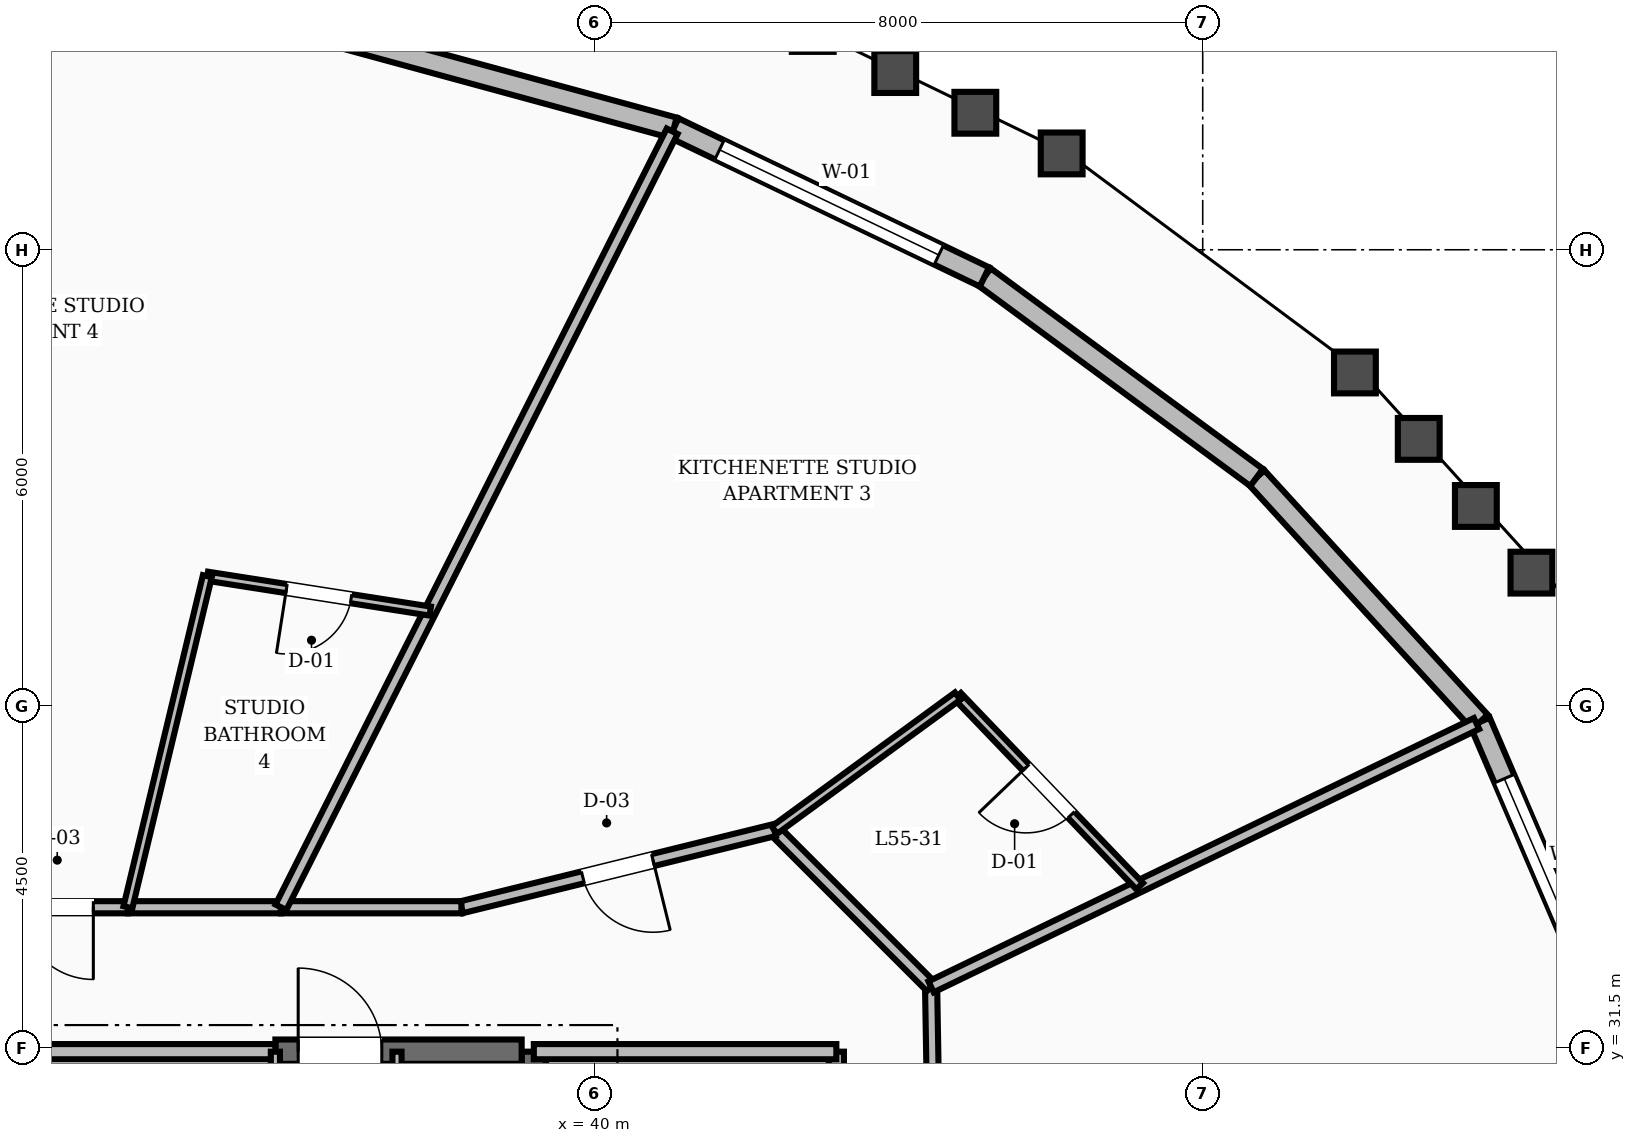
"""IFC4 building model, lengths in metres.
Left out: names, types, materials, properties, quantities, classifications, styles, units other than length and angle.
Written with IfcOpenShell. Run it as: python <this file> out.ifc"""

import sys

from ifc_helpers import new_model, si_unit, direction, frame, frame_2d, origin, place, context, subcontext, project, spatial, rectangle, extrude, element, fill, save


model = new_model("IFC4")
c1 = context("Model", 3, precision=1e-05, world=origin(), true_north=direction((0.0, 1.0)))
c2 = subcontext(c1, "Body", "Model", "MODEL_VIEW")
j1 = project(units=[si_unit("LENGTHUNIT", "METRE"), si_unit("PLANEANGLEUNIT", "RADIAN")], contexts=[c1])
p1 = place(None, origin())
s1 = spatial("IfcSite", under=j1, at=p1, CompositionType="ELEMENT")
p2 = place(p1, origin())
s2 = spatial("IfcBuilding", under=s1, at=p2, CompositionType="ELEMENT")
p3 = place(p2, frame((0.0, 0.0, 214.8)))
s3 = spatial("IfcBuildingStorey", under=s2, at=p3, CompositionType="ELEMENT", Elevation=214.8)
p4 = place(p3, frame((39.2, 25.15, 0.0), z_axis=(0.0, 0.0, 1.0), x_axis=(0.0, 1.0, 0.0)))
e1 = element("IfcWall", 1, at=p4, inside=s3, PredefinedType="SHEAR", context=c2, shape_type="SweptSolid", body=[
    extrude(rectangle(XDim=6.3, YDim=0.32, at=frame_2d((3.15, 0.0))), origin(), (0.0, 0.0, 1.0), 3.6),
])
p5 = place(p3, frame((35.8, 31.45, 0.0), z_axis=(0.0, 0.0, 1.0), x_axis=(1.0, 0.0, 0.0)))
e2 = element("IfcWall", 2, at=p5, inside=s3, PredefinedType="SHEAR", context=c2, shape_type="SweptSolid", body=[
    extrude(rectangle(XDim=3.24, YDim=0.32, at=frame_2d((1.62, 0.0))), origin(), (0.0, 0.0, 1.0), 3.6),
])
p6 = place(p5, frame((0.3, 0.0, 0.0)))
e3 = element("IfcOpeningElement", 3, at=p6, cuts=e2, PredefinedType="OPENING", context=c2, shape_type="SweptSolid", body=[
    extrude(rectangle(XDim=1.1, YDim=2.1, at=frame_2d((0.55, 1.05))), frame((0.0, 0.17, 0.0), z_axis=(0.0, -1.0, 0.0), x_axis=(1.0, 0.0, 0.0)), (0.0, 0.0, 1.0), 0.34),
])
p7 = place(p3, frame((53.35, 31.821, 0.0), z_axis=(0.0, 0.0, 1.0), x_axis=(-0.394335596309, 0.918966505094, 0.0)))
e4 = element("IfcWall", 4, at=p7, inside=s3, PredefinedType="STANDARD", context=c2, shape_type="SweptSolid", body=[
    extrude(rectangle(XDim=4.317, YDim=0.28, at=frame_2d((2.159, 0.0))), origin(), (0.0, 0.0, 1.0), 2.88),
])
p8 = place(p7, frame((0.905, 0.0, 0.8)))
e5 = element("IfcOpeningElement", 5, at=p8, cuts=e4, PredefinedType="OPENING", context=c2, shape_type="SweptSolid", body=[
    extrude(rectangle(XDim=2.6, YDim=1.65, at=frame_2d((1.3, 0.825))), frame((0.0, 0.15, 0.0), z_axis=(0.0, -1.0, 0.0), x_axis=(1.0, 0.0, 0.0)), (0.0, 0.0, 1.0), 0.3),
])
p9 = place(p3, frame((51.648, 35.789, 0.0), z_axis=(0.0, 0.0, 1.0), x_axis=(-0.674642715371, 0.73814443478, 0.0)))
e6 = element("IfcWall", 6, at=p9, inside=s3, PredefinedType="STANDARD", context=c2, shape_type="SweptSolid", body=[
    extrude(rectangle(XDim=4.356, YDim=0.28, at=frame_2d((2.178, 0.0))), origin(), (0.0, 0.0, 1.0), 2.88),
])
p10 = place(p3, frame((48.709, 39.004, 0.0), z_axis=(0.0, 0.0, 1.0), x_axis=(-0.8050103103, 0.593260819801, 0.0)))
e7 = element("IfcWall", 7, at=p10, inside=s3, PredefinedType="STANDARD", context=c2, shape_type="SweptSolid", body=[
    extrude(rectangle(XDim=4.448, YDim=0.28, at=frame_2d((2.224, 0.0))), origin(), (0.0, 0.0, 1.0), 2.88),
])
p11 = place(p3, frame((45.128, 41.643, 0.0), z_axis=(0.0, 0.0, 1.0), x_axis=(-0.90155079899, 0.432673267999, 0.0)))
e8 = element("IfcWall", 8, at=p11, inside=s3, PredefinedType="STANDARD", context=c2, shape_type="SweptSolid", body=[
    extrude(rectangle(XDim=4.531, YDim=0.28, at=frame_2d((2.266, 0.0))), origin(), (0.0, 0.0, 1.0), 2.88),
])
p12 = place(p11, frame((0.666, 0.0, 0.8)))
e9 = element("IfcOpeningElement", 9, at=p12, cuts=e8, PredefinedType="OPENING", context=c2, shape_type="SweptSolid", body=[
    extrude(rectangle(XDim=3.2, YDim=1.65, at=frame_2d((1.6, 0.825))), frame((0.0, 0.15, 0.0), z_axis=(0.0, -1.0, 0.0), x_axis=(1.0, 0.0, 0.0)), (0.0, 0.0, 1.0), 0.3),
])
p13 = place(p3, frame((41.043, 43.604, 0.0), z_axis=(0.0, 0.0, 1.0), x_axis=(-0.964839814396, 0.26283860553, 0.0)))
e10 = element("IfcWall", 10, at=p13, inside=s3, PredefinedType="STANDARD", context=c2, shape_type="SweptSolid", body=[
    extrude(rectangle(XDim=4.594, YDim=0.28, at=frame_2d((2.297, 0.0))), origin(), (0.0, 0.0, 1.0), 2.88),
])
p14 = place(p3, frame((43.18, 28.32, 0.0), z_axis=(0.0, 0.0, 1.0), x_axis=(0.0, 1.0, 0.0)))
e11 = element("IfcWall", 11, at=p14, inside=s3, PredefinedType="SOLIDWALL", context=c2, shape_type="SweptSolid", body=[
    extrude(rectangle(XDim=3.13, YDim=0.2, at=frame_2d((1.565, 0.0))), origin(), (0.0, 0.0, 1.0), 2.87),
])
p15 = place(p14, frame((1.015, 0.0, 0.0)))
e12 = element("IfcOpeningElement", 12, at=p15, cuts=e11, PredefinedType="OPENING", context=c2, shape_type="SweptSolid", body=[
    extrude(rectangle(XDim=1.1, YDim=2.1, at=frame_2d((0.55, 1.05))), frame((0.0, 0.11, 0.0), z_axis=(0.0, -1.0, 0.0), x_axis=(1.0, 0.0, 0.0)), (0.0, 0.0, 1.0), 0.22),
])
p16 = place(p3, frame((39.2, 31.45, 0.0), z_axis=(0.0, 0.0, 1.0), x_axis=(1.0, 0.0, 0.0)))
e13 = element("IfcWall", 13, at=p16, inside=s3, PredefinedType="SOLIDWALL", context=c2, shape_type="SweptSolid", body=[
    extrude(rectangle(XDim=3.98, YDim=0.2, at=frame_2d((1.99, 0.0))), origin(), (0.0, 0.0, 1.0), 2.87),
])
p17 = place(p3, frame((28.2, 31.45, 0.0), z_axis=(0.0, 0.0, 1.0), x_axis=(1.0, 0.0, 0.0)))
e14 = element("IfcWall", 14, at=p17, inside=s3, PredefinedType="SOLIDWALL", context=c2, shape_type="SweptSolid", body=[
    extrude(rectangle(XDim=7.6, YDim=0.2, at=frame_2d((3.8, 0.0))), origin(), (0.0, 0.0, 1.0), 2.87),
])
p18 = place(p3, frame((35.8, 27.95, 0.0), z_axis=(0.0, 0.0, 1.0), x_axis=(0.0, 1.0, 0.0)))
e15 = element("IfcWall", 15, at=p18, inside=s3, PredefinedType="PARTITIONING", context=c2, shape_type="SweptSolid", body=[
    extrude(rectangle(XDim=3.5, YDim=0.12, at=frame_2d((1.75, 0.0))), origin(), (0.0, 0.0, 1.0), 2.87),
])
p19 = place(p18, frame((1.275, 0.0, 0.0)))
e16 = element("IfcOpeningElement", 16, at=p19, cuts=e15, PredefinedType="OPENING", context=c2, shape_type="SweptSolid", body=[
    extrude(rectangle(XDim=0.95, YDim=2.1, at=frame_2d((0.475, 1.05))), frame((0.0, 0.07, 0.0), z_axis=(0.0, -1.0, 0.0), x_axis=(1.0, 0.0, 0.0)), (0.0, 0.0, 1.0), 0.14),
])
p20 = place(p3, frame((37.4, 25.25, 0.0), z_axis=(0.0, 0.0, 1.0), x_axis=(0.0, 1.0, 0.0)))
e17 = element("IfcWall", 17, at=p20, inside=s3, PredefinedType="PARTITIONING", context=c2, shape_type="SweptSolid", body=[
    extrude(rectangle(XDim=6.2, YDim=0.12, at=frame_2d((3.1, 0.0))), origin(), (0.0, 0.0, 1.0), 2.87),
])
p21 = place(p20, frame((0.8, 0.0, 0.0)))
e18 = element("IfcOpeningElement", 18, at=p21, cuts=e17, PredefinedType="OPENING", context=c2, shape_type="SweptSolid", body=[
    extrude(rectangle(XDim=0.86, YDim=2.1, at=frame_2d((0.43, 1.05))), frame((0.0, 0.07, 0.0), z_axis=(0.0, -1.0, 0.0), x_axis=(1.0, 0.0, 0.0)), (0.0, 0.0, 1.0), 0.14),
])
p22 = place(p20, frame((3.8, 0.0, 0.0)))
e19 = element("IfcOpeningElement", 19, at=p22, cuts=e17, PredefinedType="OPENING", context=c2, shape_type="SweptSolid", body=[
    extrude(rectangle(XDim=0.86, YDim=2.1, at=frame_2d((0.43, 1.05))), frame((0.0, 0.07, 0.0), z_axis=(0.0, -1.0, 0.0), x_axis=(1.0, 0.0, 0.0)), (0.0, 0.0, 1.0), 0.14),
])
p23 = place(p3, frame((44.48, 29.169, 0.0), z_axis=(0.0, 0.0, 1.0), x_axis=(-0.016981035134, 0.999855811828, 0.0)))
e20 = element("IfcWall", 20, at=p23, inside=s3, PredefinedType="SOLIDWALL", context=c2, shape_type="SweptSolid", body=[
    extrude(rectangle(XDim=3.134, YDim=0.16, at=frame_2d((1.567, 0.0))), origin(), (0.0, 0.0, 1.0), 2.87),
])
p24 = place(p3, frame((44.427, 32.303, 0.0), z_axis=(0.0, 0.0, 1.0), x_axis=(-0.707106781187, 0.707106781187, 0.0)))
e21 = element("IfcWall", 21, at=p24, inside=s3, PredefinedType="SOLIDWALL", context=c2, shape_type="SweptSolid", body=[
    extrude(rectangle(XDim=2.916, YDim=0.16, at=frame_2d((1.458, 0.0))), origin(), (0.0, 0.0, 1.0), 2.87),
])
p25 = place(p3, frame((42.365, 34.365, 0.0), z_axis=(0.0, 0.0, 1.0), x_axis=(-0.970939799552, -0.239323850978, 0.0)))
e22 = element("IfcWall", 22, at=p25, inside=s3, PredefinedType="SOLIDWALL", context=c2, shape_type="SweptSolid", body=[
    extrude(rectangle(XDim=4.241, YDim=0.16, at=frame_2d((2.12, 0.0))), origin(), (0.0, 0.0, 1.0), 2.87),
])
p26 = place(p25, frame((1.646, 0.0, 0.0)))
e23 = element("IfcOpeningElement", 23, at=p26, cuts=e22, PredefinedType="OPENING", context=c2, shape_type="SweptSolid", body=[
    extrude(rectangle(XDim=0.95, YDim=2.1, at=frame_2d((0.475, 1.05))), frame((0.0, 0.09, 0.0), z_axis=(0.0, -1.0, 0.0), x_axis=(1.0, 0.0, 0.0)), (0.0, 0.0, 1.0), 0.18),
])
p27 = place(p3, frame((38.248, 33.35, 0.0), z_axis=(0.0, 0.0, 1.0), x_axis=(-1.0, 0.0, 0.0)))
e24 = element("IfcWall", 24, at=p27, inside=s3, PredefinedType="SOLIDWALL", context=c2, shape_type="SweptSolid", body=[
    extrude(rectangle(XDim=2.375, YDim=0.16, at=frame_2d((1.188, 0.0))), origin(), (0.0, 0.0, 1.0), 2.87),
])
p28 = place(p3, frame((35.873, 33.35, 0.0), z_axis=(0.0, 0.0, 1.0), x_axis=(-1.0, 0.0, 0.0)))
e25 = element("IfcWall", 25, at=p28, inside=s3, PredefinedType="SOLIDWALL", context=c2, shape_type="SweptSolid", body=[
    extrude(rectangle(XDim=2.013, YDim=0.16, at=frame_2d((1.006, 0.0))), origin(), (0.0, 0.0, 1.0), 2.87),
])
p29 = place(p3, frame((33.86, 33.35, 0.0), z_axis=(0.0, 0.0, 1.0), x_axis=(-1.0, 0.0, 0.0)))
e26 = element("IfcWall", 26, at=p29, inside=s3, PredefinedType="SOLIDWALL", context=c2, shape_type="SweptSolid", body=[
    extrude(rectangle(XDim=1.86, YDim=0.16, at=frame_2d((0.93, 0.0))), origin(), (0.0, 0.0, 1.0), 2.87),
])
p30 = place(p29, frame((0.455, 0.0, 0.0)))
e27 = element("IfcOpeningElement", 27, at=p30, cuts=e26, PredefinedType="OPENING", context=c2, shape_type="SweptSolid", body=[
    extrude(rectangle(XDim=0.95, YDim=2.1, at=frame_2d((0.475, 1.05))), frame((0.0, 0.09, 0.0), z_axis=(0.0, -1.0, 0.0), x_axis=(1.0, 0.0, 0.0)), (0.0, 0.0, 1.0), 0.18),
])
p31 = place(p3, frame((44.427, 32.303, 0.0), z_axis=(0.0, 0.0, 1.0), x_axis=(0.900578522431, 0.434693368867, 0.0)))
e28 = element("IfcWall", 28, at=p31, inside=s3, PredefinedType="SOLIDWALL", context=c2, shape_type="SweptSolid", body=[
    extrude(rectangle(XDim=7.968, YDim=0.16, at=frame_2d((3.984, 0.0))), origin(), (0.0, 0.0, 1.0), 2.87),
])
p32 = place(p3, frame((47.171, 33.628, 0.0), z_axis=(0.0, 0.0, 1.0), x_axis=(-0.691782824038, 0.722105618567, 0.0)))
e29 = element("IfcWall", 29, at=p32, inside=s3, PredefinedType="PARTITIONING", context=c2, shape_type="SweptSolid", body=[
    extrude(rectangle(XDim=3.462, YDim=0.12, at=frame_2d((1.731, 0.0))), origin(), (0.0, 0.0, 1.0), 2.87),
])
p33 = place(p32, frame((1.301, 0.0, 0.0)))
e30 = element("IfcOpeningElement", 30, at=p33, cuts=e29, PredefinedType="OPENING", context=c2, shape_type="SweptSolid", body=[
    extrude(rectangle(XDim=0.86, YDim=2.1, at=frame_2d((0.43, 1.05))), frame((0.0, 0.07, 0.0), z_axis=(0.0, -1.0, 0.0), x_axis=(1.0, 0.0, 0.0)), (0.0, 0.0, 1.0), 0.14),
])
p34 = place(p3, frame((42.365, 34.365, 0.0), z_axis=(0.0, 0.0, 1.0), x_axis=(0.807220331386, 0.590250232187, 0.0)))
e31 = element("IfcWall", 31, at=p34, inside=s3, PredefinedType="PARTITIONING", context=c2, shape_type="SweptSolid", body=[
    extrude(rectangle(XDim=2.986, YDim=0.12, at=frame_2d((1.493, 0.0))), origin(), (0.0, 0.0, 1.0), 2.87),
])
p35 = place(p3, frame((35.873, 33.35, 0.0), z_axis=(0.0, 0.0, 1.0), x_axis=(0.450217644686, 0.892918849848, 0.0)))
e32 = element("IfcWall", 32, at=p35, inside=s3, PredefinedType="SOLIDWALL", context=c2, shape_type="SweptSolid", body=[
    extrude(rectangle(XDim=11.433, YDim=0.16, at=frame_2d((5.717, 0.0))), origin(), (0.0, 0.0, 1.0), 2.87),
])
p36 = place(p3, frame((37.837, 37.246, 0.0), z_axis=(0.0, 0.0, 1.0), x_axis=(-0.987985360341, 0.154547493513, 0.0)))
e33 = element("IfcWall", 33, at=p36, inside=s3, PredefinedType="PARTITIONING", context=c2, shape_type="SweptSolid", body=[
    extrude(rectangle(XDim=2.968, YDim=0.12, at=frame_2d((1.484, 0.0))), origin(), (0.0, 0.0, 1.0), 2.87),
])
p37 = place(p36, frame((1.054, 0.0, 0.0)))
e34 = element("IfcOpeningElement", 34, at=p37, cuts=e33, PredefinedType="OPENING", context=c2, shape_type="SweptSolid", body=[
    extrude(rectangle(XDim=0.86, YDim=2.1, at=frame_2d((0.43, 1.05))), frame((0.0, 0.07, 0.0), z_axis=(0.0, -1.0, 0.0), x_axis=(1.0, 0.0, 0.0)), (0.0, 0.0, 1.0), 0.14),
])
p38 = place(p3, frame((33.86, 33.35, 0.0), z_axis=(0.0, 0.0, 1.0), x_axis=(0.233315222818, 0.972401155286, 0.0)))
e35 = element("IfcWall", 35, at=p38, inside=s3, PredefinedType="PARTITIONING", context=c2, shape_type="SweptSolid", body=[
    extrude(rectangle(XDim=4.479, YDim=0.12, at=frame_2d((2.239, 0.0))), origin(), (0.0, 0.0, 1.0), 2.87),
])
p39 = place(p8, origin())
e36 = element("IfcWindow", 36, at=p39, inside=s3, PartitioningType="SINGLE_PANEL", PredefinedType="WINDOW", context=c2, shape_type="SweptSolid", body=[
    extrude(rectangle(XDim=2.6, YDim=1.65, at=frame_2d((1.3, 0.825))), frame((0.0, 0.03, 0.0), z_axis=(0.0, -1.0, 0.0), x_axis=(1.0, 0.0, 0.0)), (0.0, 0.0, 1.0), 0.06),
])
fill(e5, e36)
p40 = place(p12, origin())
e37 = element("IfcWindow", 37, at=p40, inside=s3, PartitioningType="SINGLE_PANEL", PredefinedType="WINDOW", context=c2, shape_type="SweptSolid", body=[
    extrude(rectangle(XDim=3.2, YDim=1.65, at=frame_2d((1.6, 0.825))), frame((0.0, 0.03, 0.0), z_axis=(0.0, -1.0, 0.0), x_axis=(1.0, 0.0, 0.0)), (0.0, 0.0, 1.0), 0.06),
])
fill(e9, e37)
p41 = place(p6, origin())
e38 = element("IfcDoor", 38, at=p41, inside=s3, OperationType="SINGLE_SWING_LEFT", PredefinedType="DOOR", context=c2, shape_type="SweptSolid", body=[
    extrude(rectangle(XDim=1.1, YDim=2.1, at=frame_2d((0.55, 1.05))), frame((0.0, 0.025, 0.0), z_axis=(0.0, -1.0, 0.0), x_axis=(1.0, 0.0, 0.0)), (0.0, 0.0, 1.0), 0.05),
])
fill(e3, e38)
p42 = place(p33, origin())
e39 = element("IfcDoor", 39, at=p42, inside=s3, OperationType="SINGLE_SWING_RIGHT", PredefinedType="DOOR", context=c2, shape_type="SweptSolid", body=[
    extrude(rectangle(XDim=0.86, YDim=2.1, at=frame_2d((0.43, 1.05))), frame((0.0, 0.025, 0.0), z_axis=(0.0, -1.0, 0.0), x_axis=(1.0, 0.0, 0.0)), (0.0, 0.0, 1.0), 0.05),
])
fill(e30, e39)
p43 = place(p26, origin())
e40 = element("IfcDoor", 40, at=p43, inside=s3, OperationType="SINGLE_SWING_LEFT", PredefinedType="DOOR", context=c2, shape_type="SweptSolid", body=[
    extrude(rectangle(XDim=0.95, YDim=2.1, at=frame_2d((0.475, 1.05))), frame((0.0, 0.025, 0.0), z_axis=(0.0, -1.0, 0.0), x_axis=(1.0, 0.0, 0.0)), (0.0, 0.0, 1.0), 0.05),
])
fill(e23, e40)
p44 = place(p37, origin())
e41 = element("IfcDoor", 41, at=p44, inside=s3, OperationType="SINGLE_SWING_RIGHT", PredefinedType="DOOR", context=c2, shape_type="SweptSolid", body=[
    extrude(rectangle(XDim=0.86, YDim=2.1, at=frame_2d((0.43, 1.05))), frame((0.0, 0.025, 0.0), z_axis=(0.0, -1.0, 0.0), x_axis=(1.0, 0.0, 0.0)), (0.0, 0.0, 1.0), 0.05),
])
fill(e34, e41)
p45 = place(p30, origin())
e42 = element("IfcDoor", 42, at=p45, inside=s3, OperationType="SINGLE_SWING_LEFT", PredefinedType="DOOR", context=c2, shape_type="SweptSolid", body=[
    extrude(rectangle(XDim=0.95, YDim=2.1, at=frame_2d((0.475, 1.05))), frame((0.0, 0.025, 0.0), z_axis=(0.0, -1.0, 0.0), x_axis=(1.0, 0.0, 0.0)), (0.0, 0.0, 1.0), 0.05),
])
fill(e27, e42)
save(model, sys.argv[1])
